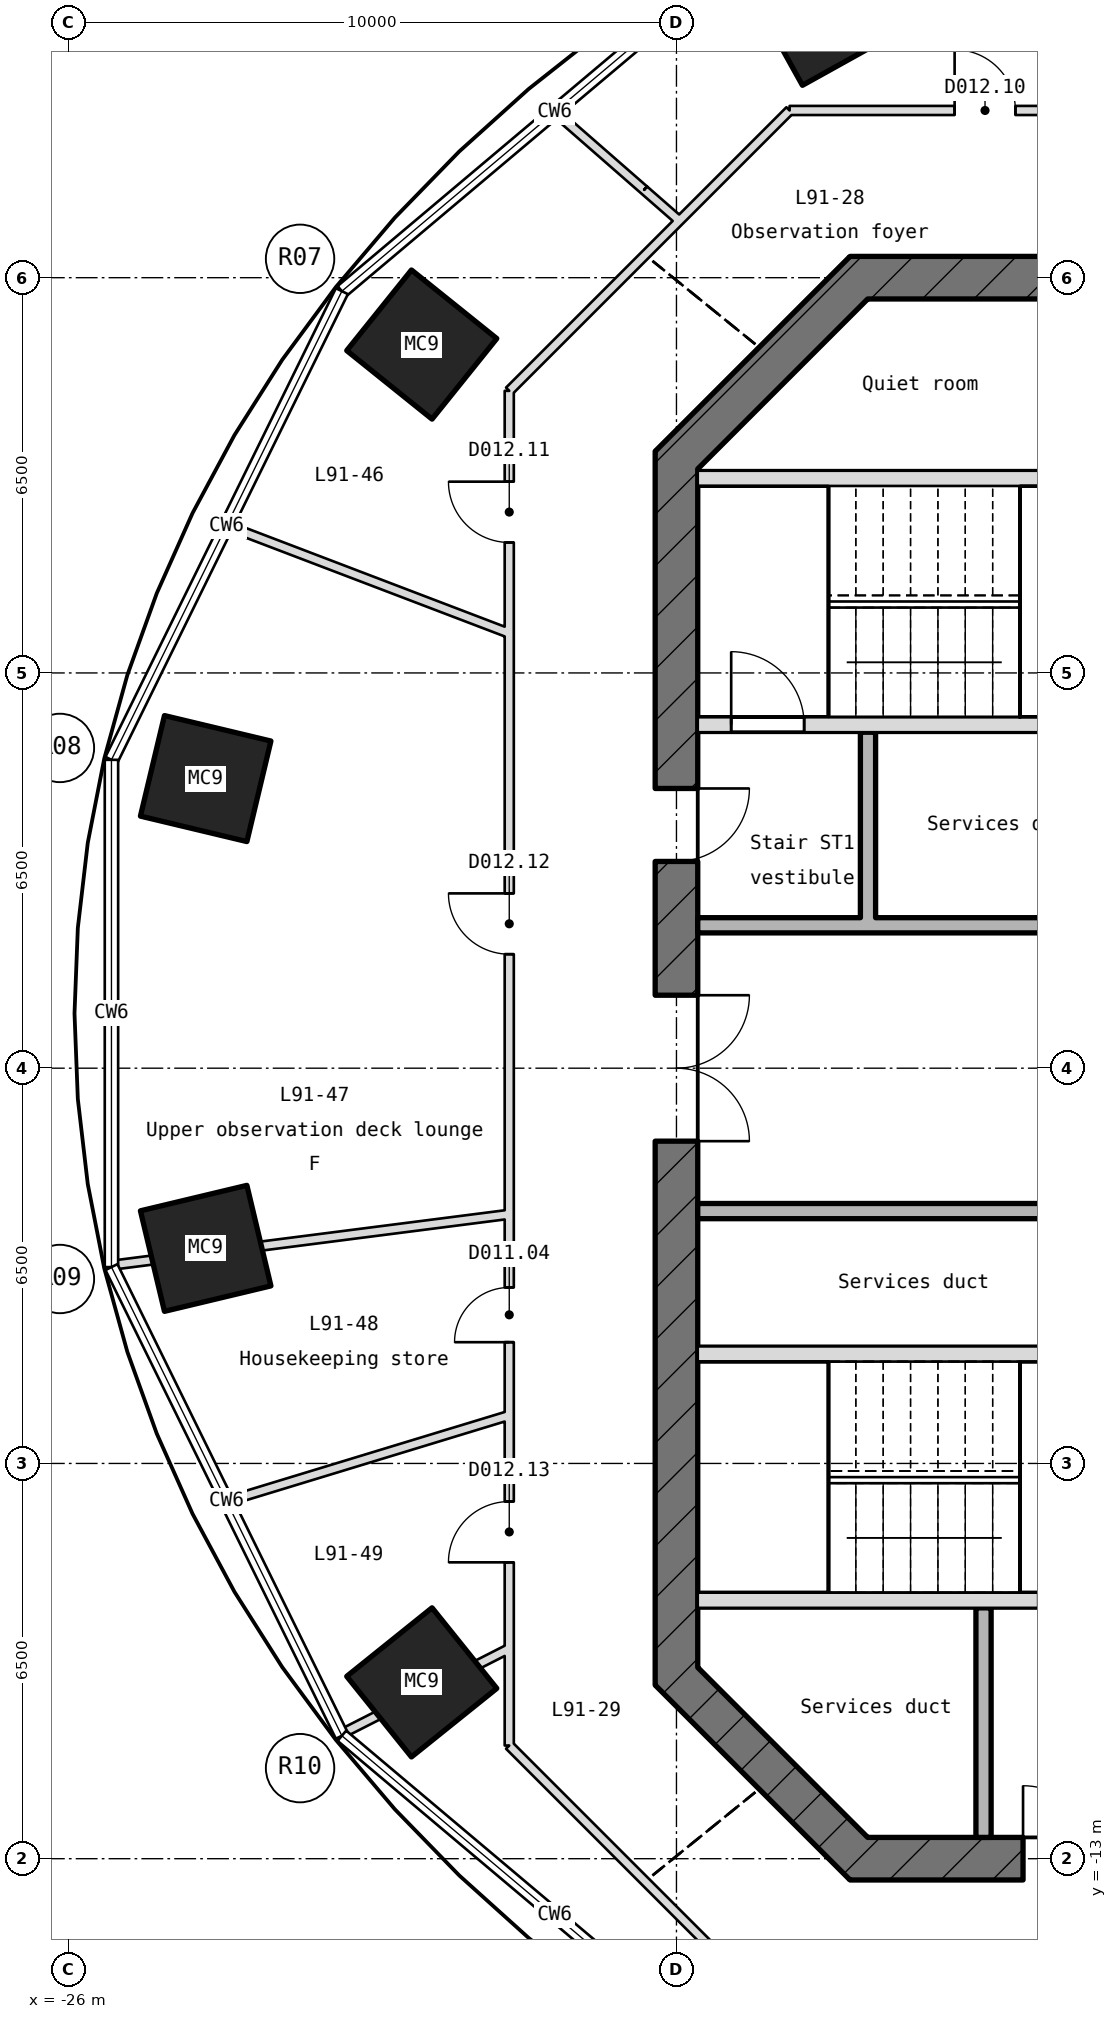
"""IFC4 building model, lengths in metres.
Left out: names, types, materials, properties, quantities, classifications, styles, units other than length and angle.
Written with IfcOpenShell. Run it as: python <this file> out.ifc"""

import sys

from ifc_helpers import new_model, si_unit, direction, frame, frame_2d, origin, origin_2d, place, context, subcontext, project, spatial, rectangle, hollow_rectangle, extrude, element, fill, save


model = new_model("IFC4")
c1 = context("Model", 3, precision=1e-05, world=origin(), true_north=direction((0.0, 1.0)))
c2 = subcontext(c1, "Body", "Model", "MODEL_VIEW")
j1 = project(units=[si_unit("LENGTHUNIT", "METRE"), si_unit("PLANEANGLEUNIT", "RADIAN")], contexts=[c1])
p1 = place(None, origin())
s1 = spatial("IfcSite", under=j1, at=p1, CompositionType="ELEMENT")
p2 = place(p1, origin())
s2 = spatial("IfcBuilding", under=s1, at=p2, CompositionType="ELEMENT")
p3 = place(p2, frame((0.0, 0.0, 401.95)))
s3 = spatial("IfcBuildingStorey", under=s2, at=p3, CompositionType="ELEMENT", Elevation=401.95)
for number, where, z_axis, x_axis in (
    (1, (-13.623, 17.363, -0.25), (0.0, 0.0, 1.0), (0.874, 0.486, 0.0)),
    (2, (-20.189, 11.9, -0.25), (0.0, 0.0, 1.0), (0.626, 0.78, 0.0)),
    (3, (-23.743, 4.763, -0.25), (0.0, 0.0, 1.0), (0.233, 0.973, 0.0)),
    (4, (-23.743, -2.963, -0.25), (0.0, 0.0, 1.0), (-0.233, 0.973, 0.0)),
    (5, (-20.189, -10.1, -0.25), (0.0, 0.0, 1.0), (-0.626, 0.78, 0.0)),
):
    element("IfcColumn", number, at=place(p3, frame(where, z_axis=z_axis, x_axis=x_axis)), inside=s3, PredefinedType="COLUMN", context=c2, shape_type="SweptSolid", body=[
        extrude(hollow_rectangle(XDim=1.7, YDim=1.8, WallThickness=0.05, at=origin_2d()), origin(), (0.0, 0.0, 1.0), 5.55),
    ])
p4 = place(p3, frame((13.145, 13.0, -0.25), z_axis=(0.0, 0.0, 1.0), x_axis=(-1.0, 0.0, 0.0)))
e6 = element("IfcWall", 6, at=p4, inside=s3, PredefinedType="SHEAR", context=c2, shape_type="SweptSolid", body=[
    extrude(rectangle(XDim=26.29, YDim=0.7, at=frame_2d((13.145, 0.0))), origin(), (0.0, 0.0, 1.0), 5.55),
])
p5 = place(p4, frame((11.945, 0.0, 0.25)))
e7 = element("IfcOpeningElement", 7, at=p5, cuts=e6, PredefinedType="OPENING", context=c2, shape_type="SweptSolid", body=[
    extrude(rectangle(XDim=2.4, YDim=2.1, at=frame_2d((1.2, 1.05))), frame((0.0, 0.36, 0.0), z_axis=(0.0, -1.0, 0.0), x_axis=(1.0, 0.0, 0.0)), (0.0, 0.0, 1.0), 0.72),
])
p6 = place(p3, frame((-12.897, 13.103, -0.25), z_axis=(0.0, 0.0, 1.0), x_axis=(-0.707106781187, -0.707106781187, 0.0)))
e8 = element("IfcWall", 8, at=p6, inside=s3, PredefinedType="SHEAR", context=c2, shape_type="SweptSolid", body=[
    extrude(rectangle(XDim=4.533, YDim=0.7, at=frame_2d((2.266, 0.0))), origin(), (0.0, 0.0, 1.0), 5.55),
])
p7 = place(p3, frame((-16.0, 10.145, -0.25), z_axis=(0.0, 0.0, 1.0), x_axis=(0.0, -1.0, 0.0)))
e9 = element("IfcWall", 9, at=p7, inside=s3, PredefinedType="SHEAR", context=c2, shape_type="SweptSolid", body=[
    extrude(rectangle(XDim=20.29, YDim=0.7, at=frame_2d((10.145, 0.0))), origin(), (0.0, 0.0, 1.0), 5.55),
])
p8 = place(p7, frame((8.945, 0.0, 0.25)))
e10 = element("IfcOpeningElement", 10, at=p8, cuts=e9, PredefinedType="OPENING", context=c2, shape_type="SweptSolid", body=[
    extrude(rectangle(XDim=2.4, YDim=2.1, at=frame_2d((1.2, 1.05))), frame((0.0, 0.36, 0.0), z_axis=(0.0, -1.0, 0.0), x_axis=(1.0, 0.0, 0.0)), (0.0, 0.0, 1.0), 0.72),
])
p9 = place(p7, frame((5.545, 0.0, 0.25)))
e11 = element("IfcOpeningElement", 11, at=p9, cuts=e9, PredefinedType="OPENING", context=c2, shape_type="SweptSolid", body=[
    extrude(rectangle(XDim=1.2, YDim=2.1, at=frame_2d((0.6, 1.05))), frame((0.0, 0.36, 0.0), z_axis=(0.0, -1.0, 0.0), x_axis=(1.0, 0.0, 0.0)), (0.0, 0.0, 1.0), 0.72),
])
p10 = place(p3, frame((-16.103, -9.897, -0.25), z_axis=(0.0, 0.0, 1.0), x_axis=(0.707106781187, -0.707106781187, 0.0)))
e12 = element("IfcWall", 12, at=p10, inside=s3, PredefinedType="SHEAR", context=c2, shape_type="SweptSolid", body=[
    extrude(rectangle(XDim=4.533, YDim=0.7, at=frame_2d((2.266, 0.0))), origin(), (0.0, 0.0, 1.0), 5.55),
])
p11 = place(p3, frame((-13.145, -13.0, -0.25), z_axis=(0.0, 0.0, 1.0), x_axis=(1.0, 0.0, 0.0)))
e13 = element("IfcWall", 13, at=p11, inside=s3, PredefinedType="SHEAR", context=c2, shape_type="SweptSolid", body=[
    extrude(rectangle(XDim=26.29, YDim=0.7, at=frame_2d((13.145, 0.0))), origin(), (0.0, 0.0, 1.0), 5.55),
])
p12 = place(p11, frame((2.845, 0.0, 0.25)))
e14 = element("IfcOpeningElement", 14, at=p12, cuts=e13, PredefinedType="OPENING", context=c2, shape_type="SweptSolid", body=[
    extrude(rectangle(XDim=1.2, YDim=2.1, at=frame_2d((0.6, 1.05))), frame((0.0, 0.36, 0.0), z_axis=(0.0, -1.0, 0.0), x_axis=(1.0, 0.0, 0.0)), (0.0, 0.0, 1.0), 0.72),
])
p13 = place(p11, frame((6.845, 0.0, 0.25)))
e15 = element("IfcOpeningElement", 15, at=p13, cuts=e13, PredefinedType="OPENING", context=c2, shape_type="SweptSolid", body=[
    extrude(rectangle(XDim=1.4, YDim=2.1, at=frame_2d((0.7, 1.05))), frame((0.0, 0.36, 0.0), z_axis=(0.0, -1.0, 0.0), x_axis=(1.0, 0.0, 0.0)), (0.0, 0.0, 1.0), 0.72),
])
p14 = place(p11, frame((15.445, 0.0, 0.25)))
e16 = element("IfcOpeningElement", 16, at=p14, cuts=e13, PredefinedType="OPENING", context=c2, shape_type="SweptSolid", body=[
    extrude(rectangle(XDim=1.4, YDim=2.1, at=frame_2d((0.7, 1.05))), frame((0.0, 0.36, 0.0), z_axis=(0.0, -1.0, 0.0), x_axis=(1.0, 0.0, 0.0)), (0.0, 0.0, 1.0), 0.72),
])
p15 = place(p3, frame((-15.65, -8.75, -0.25), z_axis=(0.0, 0.0, 1.0), x_axis=(1.0, 0.0, 0.0)))
e17 = element("IfcWall", 17, at=p15, inside=s3, PredefinedType="SHEAR", context=c2, shape_type="SweptSolid", body=[
    extrude(rectangle(XDim=7.1, YDim=0.25, at=frame_2d((3.55, 0.0))), origin(), (0.0, 0.0, 1.0), 5.55),
])
p16 = place(p15, frame((5.6, 0.0, 0.25)))
e18 = element("IfcOpeningElement", 18, at=p16, cuts=e17, PredefinedType="OPENING", context=c2, shape_type="SweptSolid", body=[
    extrude(rectangle(XDim=1.2, YDim=2.1, at=frame_2d((0.6, 1.05))), frame((0.0, 0.135, 0.0), z_axis=(0.0, -1.0, 0.0), x_axis=(1.0, 0.0, 0.0)), (0.0, 0.0, 1.0), 0.27),
])
p17 = place(p3, frame((-15.65, -4.7, -0.25), z_axis=(0.0, 0.0, 1.0), x_axis=(1.0, 0.0, 0.0)))
e19 = element("IfcWall", 19, at=p17, inside=s3, PredefinedType="SHEAR", context=c2, shape_type="SweptSolid", body=[
    extrude(rectangle(XDim=7.1, YDim=0.25, at=frame_2d((3.55, 0.0))), origin(), (0.0, 0.0, 1.0), 5.55),
])
for number, where, z_axis, x_axis in (
    (20, (-15.65, -2.35, 0.0), (0.0, 0.0, 1.0), (1.0, 0.0, 0.0)),
    (21, (-15.65, 2.35, 0.0), (0.0, 0.0, 1.0), (1.0, 0.0, 0.0)),
):
    element("IfcWall", number, at=place(p3, frame(where, z_axis=z_axis, x_axis=x_axis)), inside=s3, PredefinedType="STANDARD", context=c2, shape_type="SweptSolid", body=[
        extrude(rectangle(XDim=7.25, YDim=0.25, at=frame_2d((3.625, 0.0))), origin(), (0.0, 0.0, 1.0), 5.3),
    ])
p18 = place(p3, frame((-15.65, 5.65, -0.25), z_axis=(0.0, 0.0, 1.0), x_axis=(1.0, 0.0, 0.0)))
e22 = element("IfcWall", 22, at=p18, inside=s3, PredefinedType="SHEAR", context=c2, shape_type="SweptSolid", body=[
    extrude(rectangle(XDim=7.1, YDim=0.25, at=frame_2d((3.55, 0.0))), origin(), (0.0, 0.0, 1.0), 5.55),
])
p19 = place(p18, frame((0.55, 0.0, 0.25)))
e23 = element("IfcOpeningElement", 23, at=p19, cuts=e22, PredefinedType="OPENING", context=c2, shape_type="SweptSolid", body=[
    extrude(rectangle(XDim=1.2, YDim=2.1, at=frame_2d((0.6, 1.05))), frame((0.0, 0.135, 0.0), z_axis=(0.0, -1.0, 0.0), x_axis=(1.0, 0.0, 0.0)), (0.0, 0.0, 1.0), 0.27),
])
p20 = place(p3, frame((-15.65, 9.7, -0.25), z_axis=(0.0, 0.0, 1.0), x_axis=(1.0, 0.0, 0.0)))
e24 = element("IfcWall", 24, at=p20, inside=s3, PredefinedType="SHEAR", context=c2, shape_type="SweptSolid", body=[
    extrude(rectangle(XDim=7.1, YDim=0.25, at=frame_2d((3.55, 0.0))), origin(), (0.0, 0.0, 1.0), 5.55),
])
p21 = place(p3, frame((-12.85, 2.475, 0.0), z_axis=(0.0, 0.0, 1.0), x_axis=(0.0, 1.0, 0.0)))
e25 = element("IfcWall", 25, at=p21, inside=s3, PredefinedType="STANDARD", context=c2, shape_type="SweptSolid", body=[
    extrude(rectangle(XDim=3.05, YDim=0.25, at=frame_2d((1.525, 0.0))), origin(), (0.0, 0.0, 1.0), 5.3),
])
p22 = place(p3, frame((-10.95, -12.65, 0.0), z_axis=(0.0, 0.0, 1.0), x_axis=(0.0, 1.0, 0.0)))
e26 = element("IfcWall", 26, at=p22, inside=s3, PredefinedType="STANDARD", context=c2, shape_type="SweptSolid", body=[
    extrude(rectangle(XDim=3.775, YDim=0.25, at=frame_2d((1.887, 0.0))), origin(), (0.0, 0.0, 1.0), 5.3),
])
p23 = place(p3, frame((-14.139, 15.75, 0.0), z_axis=(0.0, 0.0, 1.0), x_axis=(1.0, 0.0, 0.0)))
e27 = element("IfcWall", 27, at=p23, inside=s3, PredefinedType="PARTITIONING", context=c2, shape_type="SweptSolid", body=[
    extrude(rectangle(XDim=6.433, YDim=0.15, at=frame_2d((3.216, 0.0))), origin(), (0.0, 0.0, 1.0), 5.3),
])
p24 = place(p23, frame((2.714, 0.0, 0.0)))
e28 = element("IfcOpeningElement", 28, at=p24, cuts=e27, PredefinedType="OPENING", context=c2, shape_type="SweptSolid", body=[
    extrude(rectangle(XDim=1.0, YDim=2.1, at=frame_2d((0.5, 1.05))), frame((0.0, 0.085, 0.0), z_axis=(0.0, -1.0, 0.0), x_axis=(1.0, 0.0, 0.0)), (0.0, 0.0, 1.0), 0.17),
])
p25 = place(p3, frame((-25.272, -3.238, 0.0), z_axis=(0.0, 0.0, 1.0), x_axis=(0.991892586567, 0.127079096286, 0.0)))
e29 = element("IfcWall", 29, at=p25, inside=s3, PredefinedType="PARTITIONING", context=c2, shape_type="SweptSolid", body=[
    extrude(rectangle(XDim=2.457, YDim=0.15, at=frame_2d((1.229, 0.0))), origin(), (0.0, 0.0, 1.0), 5.3),
])
p26 = place(p3, frame((-22.835, -2.926, 0.0), z_axis=(0.0, 0.0, 1.0), x_axis=(0.991890098354, 0.127098516069, 0.0)))
e30 = element("IfcWall", 30, at=p26, inside=s3, PredefinedType="PARTITIONING", context=c2, shape_type="SweptSolid", body=[
    extrude(rectangle(XDim=4.118, YDim=0.15, at=frame_2d((2.059, 0.0))), origin(), (0.0, 0.0, 1.0), 4.459),
])
p27 = place(p3, frame((-23.378, -7.119, 0.0), z_axis=(0.0, 0.0, 1.0), x_axis=(0.956639037961, 0.291276073594, 0.0)))
e31 = element("IfcWall", 31, at=p27, inside=s3, PredefinedType="PARTITIONING", context=c2, shape_type="SweptSolid", body=[
    extrude(rectangle(XDim=4.838, YDim=0.15, at=frame_2d((2.419, 0.0))), origin(), (0.0, 0.0, 1.0), 5.3),
])
p28 = place(p3, frame((-21.498, -10.942, 0.0), z_axis=(0.0, 0.0, 1.0), x_axis=(0.891199467995, 0.453611627106, 0.0)))
e32 = element("IfcWall", 32, at=p28, inside=s3, PredefinedType="PARTITIONING", context=c2, shape_type="SweptSolid", body=[
    extrude(rectangle(XDim=2.468, YDim=0.15, at=frame_2d((1.234, 0.0))), origin(), (0.0, 0.0, 1.0), 5.3),
])
p29 = place(p3, frame((-19.298, -9.823, 0.0), z_axis=(0.0, 0.0, 1.0), x_axis=(0.891230195432, 0.453551252617, 0.0)))
e33 = element("IfcWall", 33, at=p29, inside=s3, PredefinedType="PARTITIONING", context=c2, shape_type="SweptSolid", body=[
    extrude(rectangle(XDim=0.615, YDim=0.15, at=frame_2d((0.308, 0.0))), origin(), (0.0, 0.0, 1.0), 4.459),
])
p30 = place(p3, frame((-18.75, 11.139, 0.0), z_axis=(0.0, 0.0, 1.0), x_axis=(0.707106781187, 0.707106781187, 0.0)))
e34 = element("IfcWall", 34, at=p30, inside=s3, PredefinedType="PARTITIONING", context=c2, shape_type="SweptSolid", body=[
    extrude(rectangle(XDim=6.521, YDim=0.15, at=frame_2d((3.26, 0.0))), origin(), (0.0, 0.0, 1.0), 5.3),
])
p31 = place(p3, frame((-18.75, -11.139, 0.0), z_axis=(0.0, 0.0, 1.0), x_axis=(0.0, 1.0, 0.0)))
e35 = element("IfcWall", 35, at=p31, inside=s3, PredefinedType="PARTITIONING", context=c2, shape_type="SweptSolid", body=[
    extrude(rectangle(XDim=22.278, YDim=0.15, at=frame_2d((11.139, 0.0))), origin(), (0.0, 0.0, 1.0), 5.3),
])
p32 = place(p31, frame((19.785, 0.0, 0.0)))
e36 = element("IfcOpeningElement", 36, at=p32, cuts=e35, PredefinedType="OPENING", context=c2, shape_type="SweptSolid", body=[
    extrude(rectangle(XDim=1.0, YDim=2.1, at=frame_2d((0.5, 1.05))), frame((0.0, 0.085, 0.0), z_axis=(0.0, -1.0, 0.0), x_axis=(1.0, 0.0, 0.0)), (0.0, 0.0, 1.0), 0.17),
])
p33 = place(p31, frame((13.014, 0.0, 0.0)))
e37 = element("IfcOpeningElement", 37, at=p33, cuts=e35, PredefinedType="OPENING", context=c2, shape_type="SweptSolid", body=[
    extrude(rectangle(XDim=1.0, YDim=2.1, at=frame_2d((0.5, 1.05))), frame((0.0, 0.085, 0.0), z_axis=(0.0, -1.0, 0.0), x_axis=(1.0, 0.0, 0.0)), (0.0, 0.0, 1.0), 0.17),
])
p34 = place(p31, frame((6.633, 0.0, 0.0)))
e38 = element("IfcOpeningElement", 38, at=p34, cuts=e35, PredefinedType="OPENING", context=c2, shape_type="SweptSolid", body=[
    extrude(rectangle(XDim=0.9, YDim=2.1, at=frame_2d((0.45, 1.05))), frame((0.0, 0.085, 0.0), z_axis=(0.0, -1.0, 0.0), x_axis=(1.0, 0.0, 0.0)), (0.0, 0.0, 1.0), 0.17),
])
p35 = place(p31, frame((3.013, 0.0, 0.0)))
e39 = element("IfcOpeningElement", 39, at=p35, cuts=e35, PredefinedType="OPENING", context=c2, shape_type="SweptSolid", body=[
    extrude(rectangle(XDim=1.0, YDim=2.1, at=frame_2d((0.5, 1.05))), frame((0.0, 0.085, 0.0), z_axis=(0.0, -1.0, 0.0), x_axis=(1.0, 0.0, 0.0)), (0.0, 0.0, 1.0), 0.17),
])
p36 = place(p3, frame((-14.139, -15.75, 0.0), z_axis=(0.0, 0.0, 1.0), x_axis=(-0.707106781187, 0.707106781187, 0.0)))
e40 = element("IfcWall", 40, at=p36, inside=s3, PredefinedType="PARTITIONING", context=c2, shape_type="SweptSolid", body=[
    extrude(rectangle(XDim=6.521, YDim=0.15, at=frame_2d((3.26, 0.0))), origin(), (0.0, 0.0, 1.0), 5.3),
])
p37 = place(p3, frame((-15.952, 13.937, 0.0), z_axis=(0.0, 0.0, 1.0), x_axis=(-0.753047703781, 0.657965923001, 0.0)))
e41 = element("IfcWall", 41, at=p37, inside=s3, PredefinedType="PARTITIONING", context=c2, shape_type="SweptSolid", body=[
    extrude(rectangle(XDim=0.77, YDim=0.15, at=frame_2d((0.385, 0.0))), origin(), (0.0, 0.0, 1.0), 4.99),
])
p38 = place(p3, frame((-16.532, 14.444, 0.0), z_axis=(0.0, 0.0, 1.0), x_axis=(-0.75310908598, 0.657895663928, 0.0)))
e42 = element("IfcWall", 42, at=p38, inside=s3, PredefinedType="PARTITIONING", context=c2, shape_type="SweptSolid", body=[
    extrude(rectangle(XDim=1.931, YDim=0.15, at=frame_2d((0.965, 0.0))), origin(), (0.0, 0.0, 1.0), 5.3),
])
p39 = place(p3, frame((-18.75, 7.152, 0.0), z_axis=(0.0, 0.0, 1.0), x_axis=(-0.934331505046, 0.356405160847, 0.0)))
e43 = element("IfcWall", 43, at=p39, inside=s3, PredefinedType="PARTITIONING", context=c2, shape_type="SweptSolid", body=[
    extrude(rectangle(XDim=4.954, YDim=0.15, at=frame_2d((2.477, 0.0))), origin(), (0.0, 0.0, 1.0), 5.3),
])
p40 = place(p19, origin())
e44 = element("IfcDoor", 44, at=p40, inside=s3, OperationType="SINGLE_SWING_RIGHT", PredefinedType="DOOR", context=c2, shape_type="SweptSolid", body=[
    extrude(rectangle(XDim=1.2, YDim=2.1, at=frame_2d((0.6, 1.05))), frame((0.0, 0.025, 0.0), z_axis=(0.0, -1.0, 0.0), x_axis=(1.0, 0.0, 0.0)), (0.0, 0.0, 1.0), 0.05),
])
fill(e23, e44)
p41 = place(p8, origin())
e45 = element("IfcDoor", 45, at=p41, inside=s3, OperationType="DOUBLE_DOOR_SINGLE_SWING", PredefinedType="DOOR", context=c2, shape_type="SweptSolid", body=[
    extrude(rectangle(XDim=2.4, YDim=2.1, at=frame_2d((1.2, 1.05))), frame((0.0, 0.025, 0.0), z_axis=(0.0, -1.0, 0.0), x_axis=(1.0, 0.0, 0.0)), (0.0, 0.0, 1.0), 0.05),
])
fill(e10, e45)
p42 = place(p9, origin())
e46 = element("IfcDoor", 46, at=p42, inside=s3, OperationType="SINGLE_SWING_RIGHT", PredefinedType="DOOR", context=c2, shape_type="SweptSolid", body=[
    extrude(rectangle(XDim=1.2, YDim=2.1, at=frame_2d((0.6, 1.05))), frame((0.0, 0.025, 0.0), z_axis=(0.0, -1.0, 0.0), x_axis=(1.0, 0.0, 0.0)), (0.0, 0.0, 1.0), 0.05),
])
fill(e11, e46)
p43 = place(p12, origin())
e47 = element("IfcDoor", 47, at=p43, inside=s3, OperationType="SINGLE_SWING_RIGHT", PredefinedType="DOOR", context=c2, shape_type="SweptSolid", body=[
    extrude(rectangle(XDim=1.2, YDim=2.1, at=frame_2d((0.6, 1.05))), frame((0.0, 0.025, 0.0), z_axis=(0.0, -1.0, 0.0), x_axis=(1.0, 0.0, 0.0)), (0.0, 0.0, 1.0), 0.05),
])
fill(e14, e47)
p44 = place(p24, origin())
e48 = element("IfcDoor", 48, at=p44, inside=s3, OperationType="SINGLE_SWING_RIGHT", PredefinedType="DOOR", context=c2, shape_type="SweptSolid", body=[
    extrude(rectangle(XDim=1.0, YDim=2.1, at=frame_2d((0.5, 1.05))), frame((0.0, 0.025, 0.0), z_axis=(0.0, -1.0, 0.0), x_axis=(1.0, 0.0, 0.0)), (0.0, 0.0, 1.0), 0.05),
])
fill(e28, e48)
p45 = place(p32, origin())
e49 = element("IfcDoor", 49, at=p45, inside=s3, OperationType="SINGLE_SWING_RIGHT", PredefinedType="DOOR", context=c2, shape_type="SweptSolid", body=[
    extrude(rectangle(XDim=1.0, YDim=2.1, at=frame_2d((0.5, 1.05))), frame((0.0, 0.025, 0.0), z_axis=(0.0, -1.0, 0.0), x_axis=(1.0, 0.0, 0.0)), (0.0, 0.0, 1.0), 0.05),
])
fill(e36, e49)
p46 = place(p33, origin())
e50 = element("IfcDoor", 50, at=p46, inside=s3, OperationType="SINGLE_SWING_RIGHT", PredefinedType="DOOR", context=c2, shape_type="SweptSolid", body=[
    extrude(rectangle(XDim=1.0, YDim=2.1, at=frame_2d((0.5, 1.05))), frame((0.0, 0.025, 0.0), z_axis=(0.0, -1.0, 0.0), x_axis=(1.0, 0.0, 0.0)), (0.0, 0.0, 1.0), 0.05),
])
fill(e37, e50)
p47 = place(p34, origin())
e51 = element("IfcDoor", 51, at=p47, inside=s3, OperationType="SINGLE_SWING_RIGHT", PredefinedType="DOOR", context=c2, shape_type="SweptSolid", body=[
    extrude(rectangle(XDim=0.9, YDim=2.1, at=frame_2d((0.45, 1.05))), frame((0.0, 0.025, 0.0), z_axis=(0.0, -1.0, 0.0), x_axis=(1.0, 0.0, 0.0)), (0.0, 0.0, 1.0), 0.05),
])
fill(e38, e51)
p48 = place(p35, origin())
e52 = element("IfcDoor", 52, at=p48, inside=s3, OperationType="SINGLE_SWING_RIGHT", PredefinedType="DOOR", context=c2, shape_type="SweptSolid", body=[
    extrude(rectangle(XDim=1.0, YDim=2.1, at=frame_2d((0.5, 1.05))), frame((0.0, 0.025, 0.0), z_axis=(0.0, -1.0, 0.0), x_axis=(1.0, 0.0, 0.0)), (0.0, 0.0, 1.0), 0.05),
])
fill(e39, e52)
save(model, sys.argv[1])
